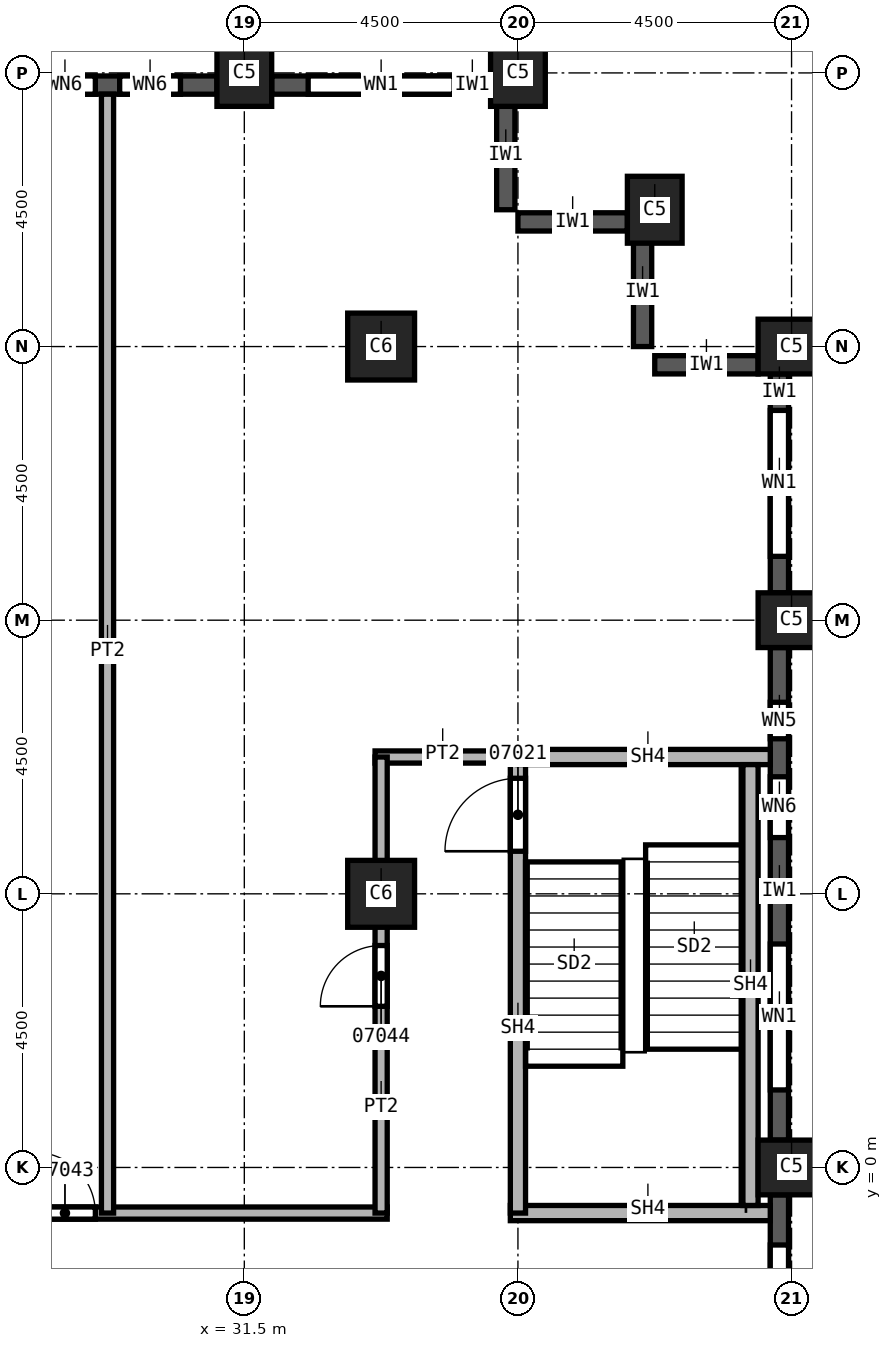
"""IFC4 building model, lengths in metres.
Left out: names, types, materials, properties, quantities, classifications, styles, units other than length and angle.
Written with IfcOpenShell. Run it as: python <this file> out.ifc"""

import sys

from ifc_helpers import new_model, si_unit, direction, frame, frame_2d, origin, origin_2d, place, context, subcontext, project, spatial, rectangle, extrude, element, fill, save


model = new_model("IFC4")
c1 = context("Model", 3, precision=1e-05, world=origin(), true_north=direction((0.0, 1.0)))
c2 = subcontext(c1, "Body", "Model", "MODEL_VIEW")
j1 = project(units=[si_unit("LENGTHUNIT", "METRE"), si_unit("PLANEANGLEUNIT", "RADIAN")], contexts=[c1])
p1 = place(None, origin())
s1 = spatial("IfcSite", under=j1, at=p1, CompositionType="ELEMENT")
p2 = place(p1, origin())
s2 = spatial("IfcBuilding", under=s1, at=p2, CompositionType="ELEMENT")
p3 = place(p2, frame((0.0, 0.0, 138.0)))
s3 = spatial("IfcBuildingStorey", under=s2, at=p3, CompositionType="ELEMENT", Elevation=138.0)
for number, where, z_axis, x_axis in (
    (1, (40.5, 0.0, 0.0), (0.0, 0.0, 1.0), (0.0, 1.0, 0.0)),
    (2, (40.5, 9.0, 0.0), (0.0, 0.0, 1.0), (0.0, 1.0, 0.0)),
    (3, (40.5, 13.5, 0.0), (0.0, 0.0, 1.0), (0.0, 1.0, 0.0)),
    (4, (38.25, 15.75, 0.0), (0.0, 0.0, 1.0), (1.0, 0.0, 0.0)),
    (5, (31.5, 18.0, 0.0), (0.0, 0.0, 1.0), (1.0, 0.0, 0.0)),
    (6, (36.0, 18.0, 0.0), (0.0, 0.0, 1.0), (1.0, 0.0, 0.0)),
):
    element("IfcColumn", number, at=place(p3, frame(where, z_axis=z_axis, x_axis=x_axis)), inside=s3, PredefinedType="COLUMN", context=c2, shape_type="SweptSolid", body=[
        extrude(rectangle(XDim=0.9, YDim=1.1, at=origin_2d()), origin(), (0.0, 0.0, 1.0), 3.7),
    ])
for number, where, z_axis, x_axis in (
    (7, (33.75, 4.5, 0.0), (0.0, 0.0, 1.0), (1.0, 0.0, 0.0)),
    (8, (33.75, 13.5, 0.0), (0.0, 0.0, 1.0), (1.0, 0.0, 0.0)),
):
    element("IfcColumn", number, at=place(p3, frame(where, z_axis=z_axis, x_axis=x_axis)), inside=s3, PredefinedType="COLUMN", context=c2, shape_type="SweptSolid", body=[
        extrude(rectangle(XDim=1.1, YDim=1.1, at=origin_2d()), origin(), (0.0, 0.0, 1.0), 3.7),
    ])
p4 = place(p3, frame((39.95, 13.2, 0.0), z_axis=(0.0, 0.0, 1.0), x_axis=(-1.0, 0.0, 0.0)))
e9 = element("IfcWall", 9, at=p4, inside=s3, PredefinedType="SOLIDWALL", context=c2, shape_type="SweptSolid", body=[
    extrude(rectangle(XDim=1.7, YDim=0.3, at=frame_2d((0.85, 0.0))), origin(), (0.0, 0.0, 1.0), 3.1),
])
for number, where, z_axis, x_axis in (
    (10, (38.05, 15.3, 0.0), (0.0, 0.0, 1.0), (0.0, -1.0, 0.0)),
    (11, (37.8, 15.55, 0.0), (0.0, 0.0, 1.0), (-1.0, 0.0, 0.0)),
    (12, (35.8, 17.55, 0.0), (0.0, 0.0, 1.0), (0.0, -1.0, 0.0)),
):
    element("IfcWall", number, at=place(p3, frame(where, z_axis=z_axis, x_axis=x_axis)), inside=s3, PredefinedType="SOLIDWALL", context=c2, shape_type="SweptSolid", body=[
        extrude(rectangle(XDim=1.8, YDim=0.3, at=frame_2d((0.9, 0.0))), origin(), (0.0, 0.0, 1.0), 3.1),
    ])
p5 = place(p3, frame((40.3, -8.55, 0.0), z_axis=(0.0, 0.0, 1.0), x_axis=(0.0, 1.0, 0.0)))
e13 = element("IfcWall", 13, at=p5, inside=s3, PredefinedType="SOLIDWALL", context=c2, shape_type="SweptSolid", body=[
    extrude(rectangle(XDim=8.1, YDim=0.3, at=frame_2d((4.05, 0.0))), origin(), (0.0, 0.0, 1.0), 3.1),
])
p6 = place(p5, frame((0.825, 0.0, 0.8)))
e14 = element("IfcOpeningElement", 14, at=p6, cuts=e13, PredefinedType="OPENING", context=c2, shape_type="SweptSolid", body=[
    extrude(rectangle(XDim=2.4, YDim=1.95, at=frame_2d((1.2, 0.975))), frame((0.0, 0.15, 0.0), z_axis=(0.0, -1.0, 0.0), x_axis=(1.0, 0.0, 0.0)), (0.0, 0.0, 1.0), 0.3),
])
p7 = place(p5, frame((4.875, 0.0, 0.8)))
e15 = element("IfcOpeningElement", 15, at=p7, cuts=e13, PredefinedType="OPENING", context=c2, shape_type="SweptSolid", body=[
    extrude(rectangle(XDim=2.4, YDim=1.95, at=frame_2d((1.2, 0.975))), frame((0.0, 0.15, 0.0), z_axis=(0.0, -1.0, 0.0), x_axis=(1.0, 0.0, 0.0)), (0.0, 0.0, 1.0), 0.3),
])
p8 = place(p3, frame((40.3, 0.45, 0.0), z_axis=(0.0, 0.0, 1.0), x_axis=(0.0, 1.0, 0.0)))
e16 = element("IfcWall", 16, at=p8, inside=s3, PredefinedType="SOLIDWALL", context=c2, shape_type="SweptSolid", body=[
    extrude(rectangle(XDim=8.1, YDim=0.3, at=frame_2d((4.05, 0.0))), origin(), (0.0, 0.0, 1.0), 3.1),
])
p9 = place(p8, frame((0.825, 0.0, 0.8)))
e17 = element("IfcOpeningElement", 17, at=p9, cuts=e16, PredefinedType="OPENING", context=c2, shape_type="SweptSolid", body=[
    extrude(rectangle(XDim=2.4, YDim=1.95, at=frame_2d((1.2, 0.975))), frame((0.0, 0.15, 0.0), z_axis=(0.0, -1.0, 0.0), x_axis=(1.0, 0.0, 0.0)), (0.0, 0.0, 1.0), 0.3),
])
p10 = place(p8, frame((4.975, 0.0, 0.8)))
e18 = element("IfcOpeningElement", 18, at=p10, cuts=e16, PredefinedType="OPENING", context=c2, shape_type="SweptSolid", body=[
    extrude(rectangle(XDim=1.0, YDim=1.95, at=frame_2d((0.5, 0.975))), frame((0.0, 0.15, 0.0), z_axis=(0.0, -1.0, 0.0), x_axis=(1.0, 0.0, 0.0)), (0.0, 0.0, 1.0), 0.3),
])
p11 = place(p8, frame((6.6, 0.0, 0.8)))
e19 = element("IfcOpeningElement", 19, at=p11, cuts=e16, PredefinedType="OPENING", context=c2, shape_type="SweptSolid", body=[
    extrude(rectangle(XDim=0.6, YDim=1.95, at=frame_2d((0.3, 0.975))), frame((0.0, 0.15, 0.0), z_axis=(0.0, -1.0, 0.0), x_axis=(1.0, 0.0, 0.0)), (0.0, 0.0, 1.0), 0.3),
])
p12 = place(p3, frame((40.3, 9.45, 0.0), z_axis=(0.0, 0.0, 1.0), x_axis=(0.0, 1.0, 0.0)))
e20 = element("IfcWall", 20, at=p12, inside=s3, PredefinedType="SOLIDWALL", context=c2, shape_type="SweptSolid", body=[
    extrude(rectangle(XDim=3.6, YDim=0.3, at=frame_2d((1.8, 0.0))), origin(), (0.0, 0.0, 1.0), 3.1),
])
p13 = place(p12, frame((0.6, 0.0, 0.8)))
e21 = element("IfcOpeningElement", 21, at=p13, cuts=e20, PredefinedType="OPENING", context=c2, shape_type="SweptSolid", body=[
    extrude(rectangle(XDim=2.4, YDim=1.95, at=frame_2d((1.2, 0.975))), frame((0.0, 0.15, 0.0), z_axis=(0.0, -1.0, 0.0), x_axis=(1.0, 0.0, 0.0)), (0.0, 0.0, 1.0), 0.3),
])
p14 = place(p3, frame((35.55, 17.8, 0.0), z_axis=(0.0, 0.0, 1.0), x_axis=(-1.0, 0.0, 0.0)))
e22 = element("IfcWall", 22, at=p14, inside=s3, PredefinedType="SOLIDWALL", context=c2, shape_type="SweptSolid", body=[
    extrude(rectangle(XDim=3.6, YDim=0.3, at=frame_2d((1.8, 0.0))), origin(), (0.0, 0.0, 1.0), 3.1),
])
p15 = place(p14, frame((0.6, 0.0, 0.8)))
e23 = element("IfcOpeningElement", 23, at=p15, cuts=e22, PredefinedType="OPENING", context=c2, shape_type="SweptSolid", body=[
    extrude(rectangle(XDim=2.4, YDim=1.95, at=frame_2d((1.2, 0.975))), frame((0.0, 0.15, 0.0), z_axis=(0.0, -1.0, 0.0), x_axis=(1.0, 0.0, 0.0)), (0.0, 0.0, 1.0), 0.3),
])
p16 = place(p3, frame((31.05, 17.8, 0.0), z_axis=(0.0, 0.0, 1.0), x_axis=(-1.0, 0.0, 0.0)))
e24 = element("IfcWall", 24, at=p16, inside=s3, PredefinedType="SOLIDWALL", context=c2, shape_type="SweptSolid", body=[
    extrude(rectangle(XDim=3.6, YDim=0.3, at=frame_2d((1.8, 0.0))), origin(), (0.0, 0.0, 1.0), 3.1),
])
p17 = place(p16, frame((0.6, 0.0, 0.8)))
e25 = element("IfcOpeningElement", 25, at=p17, cuts=e24, PredefinedType="OPENING", context=c2, shape_type="SweptSolid", body=[
    extrude(rectangle(XDim=1.0, YDim=1.95, at=frame_2d((0.5, 0.975))), frame((0.0, 0.15, 0.0), z_axis=(0.0, -1.0, 0.0), x_axis=(1.0, 0.0, 0.0)), (0.0, 0.0, 1.0), 0.3),
])
p18 = place(p16, frame((2.0, 0.0, 0.8)))
e26 = element("IfcOpeningElement", 26, at=p18, cuts=e24, PredefinedType="OPENING", context=c2, shape_type="SweptSolid", body=[
    extrude(rectangle(XDim=1.0, YDim=1.95, at=frame_2d((0.5, 0.975))), frame((0.0, 0.15, 0.0), z_axis=(0.0, -1.0, 0.0), x_axis=(1.0, 0.0, 0.0)), (0.0, 0.0, 1.0), 0.3),
])
p19 = place(p3, frame((15.4, -0.75, 0.0), z_axis=(0.0, 0.0, 1.0), x_axis=(1.0, 0.0, 0.0)))
e27 = element("IfcWall", 27, at=p19, inside=s3, PredefinedType="PARTITIONING", context=c2, shape_type="SweptSolid", body=[
    extrude(rectangle(XDim=18.45, YDim=0.2, at=frame_2d((9.225, 0.0))), origin(), (0.0, 0.0, 1.0), 3.7),
])
p20 = place(p19, frame((4.45, 0.0, 0.0)))
e28 = element("IfcOpeningElement", 28, at=p20, cuts=e27, PredefinedType="OPENING", context=c2, shape_type="SweptSolid", body=[
    extrude(rectangle(XDim=1.0, YDim=2.1, at=frame_2d((0.5, 1.05))), frame((0.0, 0.1, 0.0), z_axis=(0.0, -1.0, 0.0), x_axis=(1.0, 0.0, 0.0)), (0.0, 0.0, 1.0), 0.2),
])
p21 = place(p19, frame((12.65, 0.0, 0.0)))
e29 = element("IfcOpeningElement", 29, at=p21, cuts=e27, PredefinedType="OPENING", context=c2, shape_type="SweptSolid", body=[
    extrude(rectangle(XDim=1.0, YDim=2.1, at=frame_2d((0.5, 1.05))), frame((0.0, 0.1, 0.0), z_axis=(0.0, -1.0, 0.0), x_axis=(1.0, 0.0, 0.0)), (0.0, 0.0, 1.0), 0.2),
])
p22 = place(p3, frame((29.25, 17.65, 0.0), z_axis=(0.0, 0.0, 1.0), x_axis=(0.0, -1.0, 0.0)))
e30 = element("IfcWall", 30, at=p22, inside=s3, PredefinedType="PARTITIONING", context=c2, shape_type="SweptSolid", body=[
    extrude(rectangle(XDim=18.4, YDim=0.2, at=frame_2d((9.2, 0.0))), origin(), (0.0, 0.0, 1.0), 3.7),
])
p23 = place(p3, frame((33.65, 6.75, 0.0), z_axis=(0.0, 0.0, 1.0), x_axis=(1.0, 0.0, 0.0)))
e31 = element("IfcWall", 31, at=p23, inside=s3, PredefinedType="PARTITIONING", context=c2, shape_type="SweptSolid", body=[
    extrude(rectangle(XDim=2.35, YDim=0.2, at=frame_2d((1.175, 0.0))), origin(), (0.0, 0.0, 1.0), 3.7),
])
p24 = place(p3, frame((33.75, -0.75, 0.0), z_axis=(0.0, 0.0, 1.0), x_axis=(0.0, 1.0, 0.0)))
e32 = element("IfcWall", 32, at=p24, inside=s3, PredefinedType="PARTITIONING", context=c2, shape_type="SweptSolid", body=[
    extrude(rectangle(XDim=7.5, YDim=0.2, at=frame_2d((3.75, 0.0))), origin(), (0.0, 0.0, 1.0), 3.7),
])
p25 = place(p24, frame((3.4, 0.0, 0.0)))
e33 = element("IfcOpeningElement", 33, at=p25, cuts=e32, PredefinedType="OPENING", context=c2, shape_type="SweptSolid", body=[
    extrude(rectangle(XDim=1.0, YDim=2.1, at=frame_2d((0.5, 1.05))), frame((0.0, 0.1, 0.0), z_axis=(0.0, -1.0, 0.0), x_axis=(1.0, 0.0, 0.0)), (0.0, 0.0, 1.0), 0.2),
])
p26 = place(p3, frame((35.875, -0.75, 0.0), z_axis=(0.0, 0.0, 1.0), x_axis=(1.0, 0.0, 0.0)))
e34 = element("IfcWall", 34, at=p26, inside=s3, PredefinedType="SOLIDWALL", context=c2, shape_type="SweptSolid", body=[
    extrude(rectangle(XDim=4.275, YDim=0.25, at=frame_2d((2.137, 0.0))), origin(), (0.0, 0.0, 1.0), 3.7),
])
p27 = place(p3, frame((36.0, -0.75, 0.0), z_axis=(0.0, 0.0, 1.0), x_axis=(0.0, 1.0, 0.0)))
e35 = element("IfcWall", 35, at=p27, inside=s3, PredefinedType="SOLIDWALL", context=c2, shape_type="SweptSolid", body=[
    extrude(rectangle(XDim=7.625, YDim=0.25, at=frame_2d((3.812, 0.0))), origin(), (0.0, 0.0, 1.0), 3.7),
])
p28 = place(p27, frame((5.95, 0.0, 0.0)))
e36 = element("IfcOpeningElement", 36, at=p28, cuts=e35, PredefinedType="OPENING", context=c2, shape_type="SweptSolid", body=[
    extrude(rectangle(XDim=1.2, YDim=2.1, at=frame_2d((0.6, 1.05))), frame((0.0, 0.125, 0.0), z_axis=(0.0, -1.0, 0.0), x_axis=(1.0, 0.0, 0.0)), (0.0, 0.0, 1.0), 0.25),
])
p29 = place(p3, frame((36.0, 6.75, 0.0), z_axis=(0.0, 0.0, 1.0), x_axis=(1.0, 0.0, 0.0)))
e37 = element("IfcWall", 37, at=p29, inside=s3, PredefinedType="SOLIDWALL", context=c2, shape_type="SweptSolid", body=[
    extrude(rectangle(XDim=4.15, YDim=0.25, at=frame_2d((2.075, 0.0))), origin(), (0.0, 0.0, 1.0), 3.7),
])
p30 = place(p3, frame((39.825, -0.625, 0.0), z_axis=(0.0, 0.0, 1.0), x_axis=(0.0, 1.0, 0.0)))
e38 = element("IfcWall", 38, at=p30, inside=s3, PredefinedType="SOLIDWALL", context=c2, shape_type="SweptSolid", body=[
    extrude(rectangle(XDim=7.25, YDim=0.25, at=frame_2d((3.625, 0.0))), origin(), (0.0, 0.0, 1.0), 3.7),
])
p31 = place(p7, origin())
e39 = element("IfcWindow", 39, at=p31, inside=s3, PartitioningType="SINGLE_PANEL", PredefinedType="WINDOW", context=c2, shape_type="SweptSolid", body=[
    extrude(rectangle(XDim=2.4, YDim=1.95, at=frame_2d((1.2, 0.975))), frame((0.0, 0.03, 0.0), z_axis=(0.0, -1.0, 0.0), x_axis=(1.0, 0.0, 0.0)), (0.0, 0.0, 1.0), 0.06),
])
fill(e15, e39)
p32 = place(p9, origin())
e40 = element("IfcWindow", 40, at=p32, inside=s3, PartitioningType="SINGLE_PANEL", PredefinedType="WINDOW", context=c2, shape_type="SweptSolid", body=[
    extrude(rectangle(XDim=2.4, YDim=1.95, at=frame_2d((1.2, 0.975))), frame((0.0, 0.03, 0.0), z_axis=(0.0, -1.0, 0.0), x_axis=(1.0, 0.0, 0.0)), (0.0, 0.0, 1.0), 0.06),
])
fill(e17, e40)
p33 = place(p13, origin())
e41 = element("IfcWindow", 41, at=p33, inside=s3, PartitioningType="SINGLE_PANEL", PredefinedType="WINDOW", context=c2, shape_type="SweptSolid", body=[
    extrude(rectangle(XDim=2.4, YDim=1.95, at=frame_2d((1.2, 0.975))), frame((0.0, 0.03, 0.0), z_axis=(0.0, -1.0, 0.0), x_axis=(1.0, 0.0, 0.0)), (0.0, 0.0, 1.0), 0.06),
])
fill(e21, e41)
p34 = place(p15, origin())
e42 = element("IfcWindow", 42, at=p34, inside=s3, PartitioningType="SINGLE_PANEL", PredefinedType="WINDOW", context=c2, shape_type="SweptSolid", body=[
    extrude(rectangle(XDim=2.4, YDim=1.95, at=frame_2d((1.2, 0.975))), frame((0.0, 0.03, 0.0), z_axis=(0.0, -1.0, 0.0), x_axis=(1.0, 0.0, 0.0)), (0.0, 0.0, 1.0), 0.06),
])
fill(e23, e42)
p35 = place(p28, origin())
e43 = element("IfcDoor", 43, at=p35, inside=s3, OperationType="SINGLE_SWING_RIGHT", PredefinedType="DOOR", context=c2, shape_type="SweptSolid", body=[
    extrude(rectangle(XDim=1.2, YDim=2.1, at=frame_2d((0.6, 1.05))), frame((0.0, 0.025, 0.0), z_axis=(0.0, -1.0, 0.0), x_axis=(1.0, 0.0, 0.0)), (0.0, 0.0, 1.0), 0.05),
])
fill(e36, e43)
p36 = place(p21, origin())
e44 = element("IfcDoor", 44, at=p36, inside=s3, OperationType="SINGLE_SWING_RIGHT", PredefinedType="DOOR", context=c2, shape_type="SweptSolid", body=[
    extrude(rectangle(XDim=1.0, YDim=2.1, at=frame_2d((0.5, 1.05))), frame((0.0, 0.025, 0.0), z_axis=(0.0, -1.0, 0.0), x_axis=(1.0, 0.0, 0.0)), (0.0, 0.0, 1.0), 0.05),
])
fill(e29, e44)
p37 = place(p25, origin())
e45 = element("IfcDoor", 45, at=p37, inside=s3, OperationType="SINGLE_SWING_LEFT", PredefinedType="DOOR", context=c2, shape_type="SweptSolid", body=[
    extrude(rectangle(XDim=1.0, YDim=2.1, at=frame_2d((0.5, 1.05))), frame((0.0, 0.025, 0.0), z_axis=(0.0, -1.0, 0.0), x_axis=(1.0, 0.0, 0.0)), (0.0, 0.0, 1.0), 0.05),
])
fill(e33, e45)
p38 = place(p10, origin())
e46 = element("IfcWindow", 46, at=p38, inside=s3, PartitioningType="SINGLE_PANEL", PredefinedType="WINDOW", context=c2, shape_type="SweptSolid", body=[
    extrude(rectangle(XDim=1.0, YDim=1.95, at=frame_2d((0.5, 0.975))), frame((0.0, 0.03, 0.0), z_axis=(0.0, -1.0, 0.0), x_axis=(1.0, 0.0, 0.0)), (0.0, 0.0, 1.0), 0.06),
])
fill(e18, e46)
p39 = place(p11, origin())
e47 = element("IfcWindow", 47, at=p39, inside=s3, PartitioningType="SINGLE_PANEL", PredefinedType="WINDOW", context=c2, shape_type="SweptSolid", body=[
    extrude(rectangle(XDim=0.6, YDim=1.95, at=frame_2d((0.3, 0.975))), frame((0.0, 0.03, 0.0), z_axis=(0.0, -1.0, 0.0), x_axis=(1.0, 0.0, 0.0)), (0.0, 0.0, 1.0), 0.06),
])
fill(e19, e47)
p40 = place(p17, origin())
e48 = element("IfcWindow", 48, at=p40, inside=s3, PartitioningType="SINGLE_PANEL", PredefinedType="WINDOW", context=c2, shape_type="SweptSolid", body=[
    extrude(rectangle(XDim=1.0, YDim=1.95, at=frame_2d((0.5, 0.975))), frame((0.0, 0.03, 0.0), z_axis=(0.0, -1.0, 0.0), x_axis=(1.0, 0.0, 0.0)), (0.0, 0.0, 1.0), 0.06),
])
fill(e25, e48)
p41 = place(p18, origin())
e49 = element("IfcWindow", 49, at=p41, inside=s3, PartitioningType="SINGLE_PANEL", PredefinedType="WINDOW", context=c2, shape_type="SweptSolid", body=[
    extrude(rectangle(XDim=1.0, YDim=1.95, at=frame_2d((0.5, 0.975))), frame((0.0, 0.03, 0.0), z_axis=(0.0, -1.0, 0.0), x_axis=(1.0, 0.0, 0.0)), (0.0, 0.0, 1.0), 0.06),
])
fill(e26, e49)
save(model, sys.argv[1])
